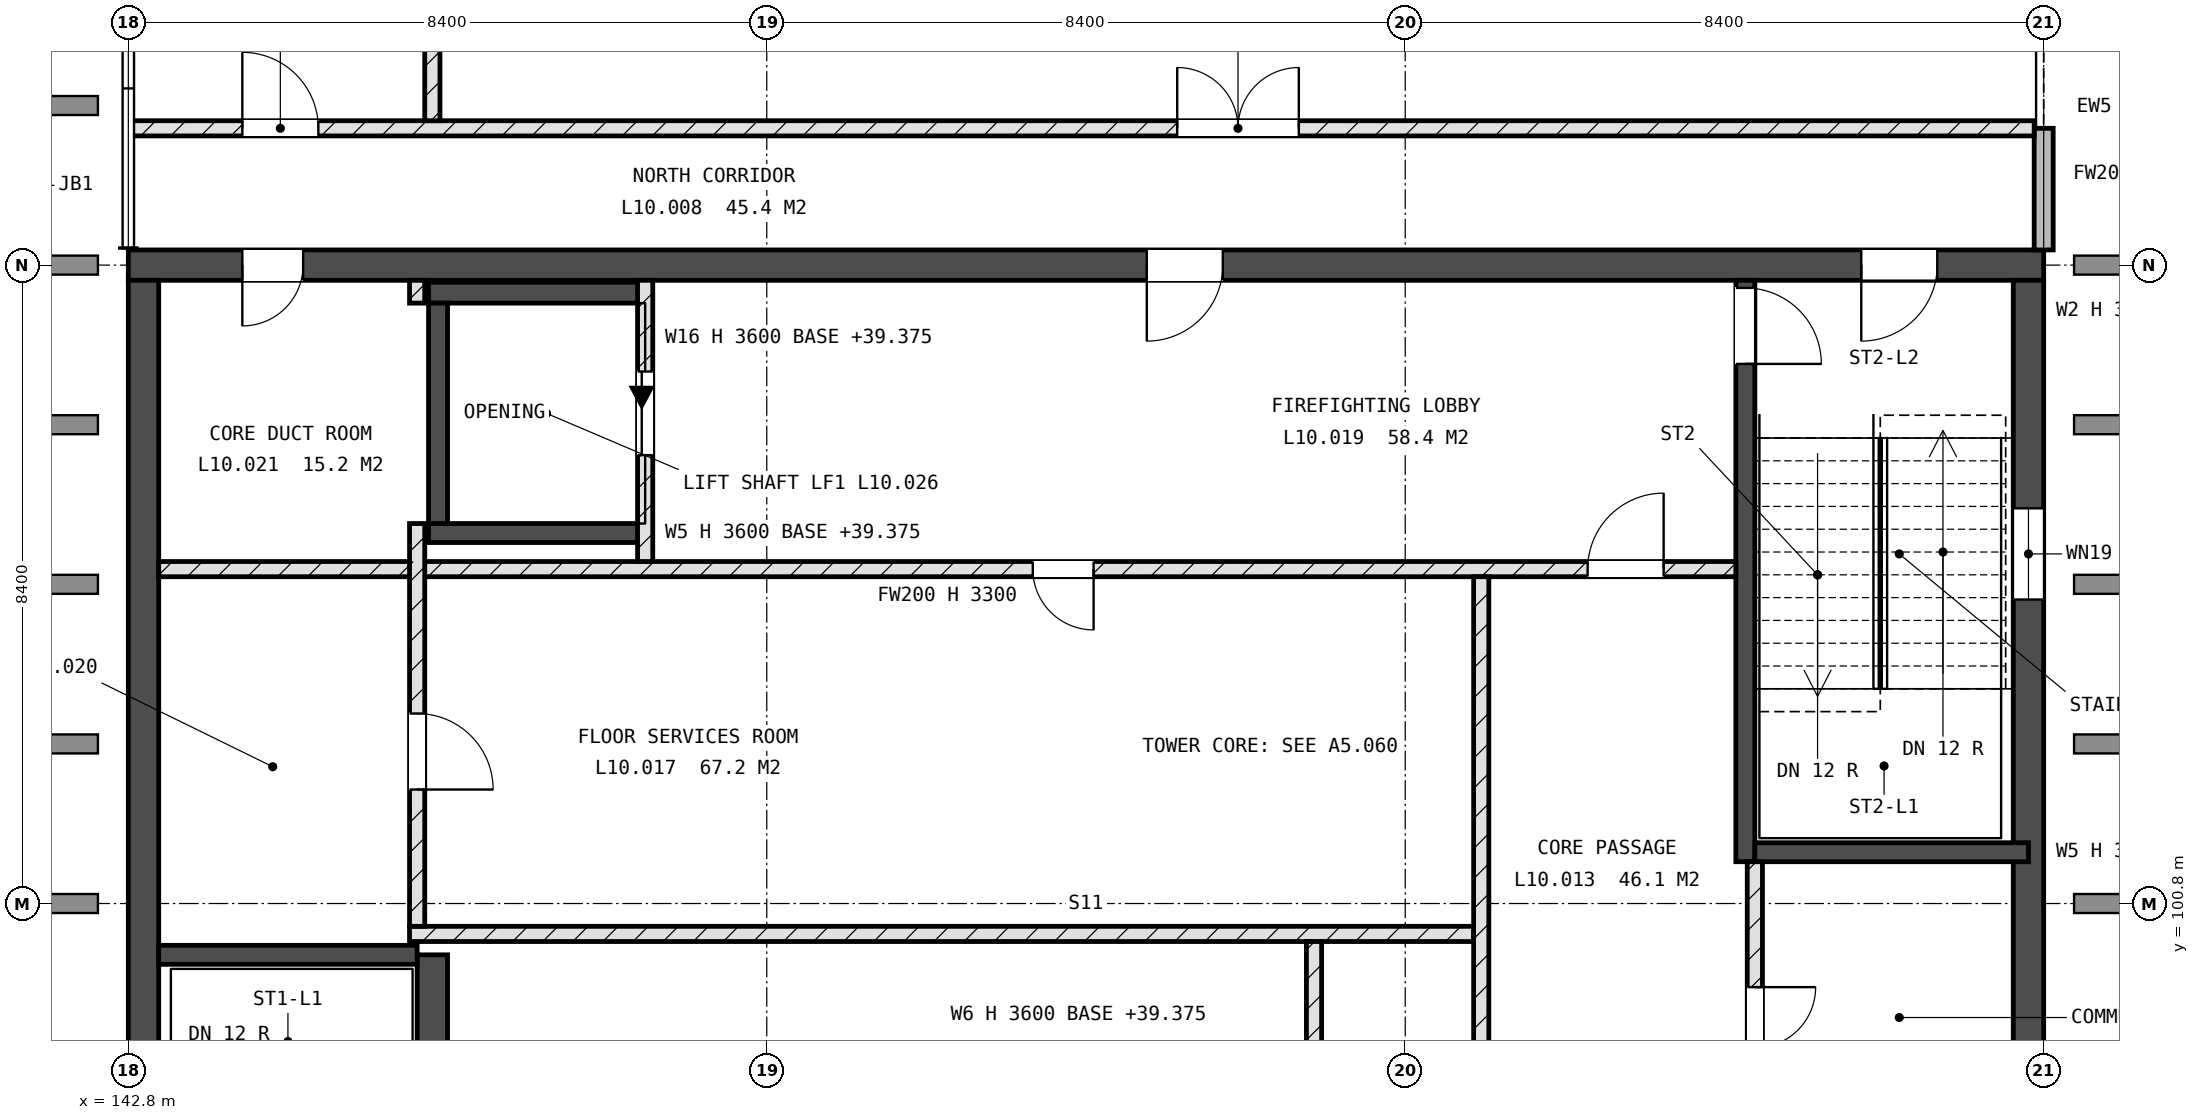
"""IFC4 building model, lengths in metres.
Left out: names, types, materials, properties, quantities, classifications, styles, units other than length and angle.
Written with IfcOpenShell. Run it as: python <this file> out.ifc"""

import sys

from ifc_helpers import new_model, si_unit, direction, frame, frame_2d, origin, place, context, subcontext, project, spatial, rectangle, extrude, element, fill, save


model = new_model("IFC4")
c1 = context("Model", 3, precision=1e-05, world=origin(), true_north=direction((0.0, 1.0)))
c2 = subcontext(c1, "Body", "Model", "MODEL_VIEW")
j1 = project(units=[si_unit("LENGTHUNIT", "METRE"), si_unit("PLANEANGLEUNIT", "RADIAN")], contexts=[c1])
p1 = place(None, origin())
s1 = spatial("IfcSite", under=j1, at=p1, CompositionType="ELEMENT")
p2 = place(p1, origin())
s2 = spatial("IfcBuilding", under=s1, at=p2, CompositionType="ELEMENT")
p3 = place(p2, frame((0.0, 0.0, 39.6)))
s3 = spatial("IfcBuildingStorey", under=s2, at=p3, CompositionType="ELEMENT", Elevation=39.6)
p4 = place(p3, frame((142.8, 109.2, -0.225), z_axis=(0.0, 0.0, 1.0), x_axis=(1.0, 0.0, 0.0)))
e1 = element("IfcWall", 1, at=p4, inside=s3, PredefinedType="SHEAR", context=c2, shape_type="SweptSolid", body=[
    extrude(rectangle(XDim=25.2, YDim=0.4, at=frame_2d((12.6, 0.0))), origin(), (0.0, 0.0, 1.0), 3.6),
])
p5 = place(p4, frame((22.8, 0.0, 0.225)))
e2 = element("IfcOpeningElement", 2, at=p5, cuts=e1, PredefinedType="OPENING", context=c2, shape_type="SweptSolid", body=[
    extrude(rectangle(XDim=1.0, YDim=2.1, at=frame_2d((0.5, 1.05))), frame((0.0, 0.21, 0.0), z_axis=(0.0, -1.0, 0.0), x_axis=(1.0, 0.0, 0.0)), (0.0, 0.0, 1.0), 0.42),
])
p6 = place(p4, frame((1.5, 0.0, 0.225)))
e3 = element("IfcOpeningElement", 3, at=p6, cuts=e1, PredefinedType="OPENING", context=c2, shape_type="SweptSolid", body=[
    extrude(rectangle(XDim=0.8, YDim=2.1, at=frame_2d((0.4, 1.05))), frame((0.0, 0.21, 0.0), z_axis=(0.0, -1.0, 0.0), x_axis=(1.0, 0.0, 0.0)), (0.0, 0.0, 1.0), 0.42),
])
p7 = place(p4, frame((13.4, 0.0, 0.225)))
e4 = element("IfcOpeningElement", 4, at=p7, cuts=e1, PredefinedType="OPENING", context=c2, shape_type="SweptSolid", body=[
    extrude(rectangle(XDim=1.0, YDim=2.1, at=frame_2d((0.5, 1.05))), frame((0.0, 0.21, 0.0), z_axis=(0.0, -1.0, 0.0), x_axis=(1.0, 0.0, 0.0)), (0.0, 0.0, 1.0), 0.42),
])
p8 = place(p3, frame((143.0, 92.6, -0.225), z_axis=(0.0, 0.0, 1.0), x_axis=(0.0, 1.0, 0.0)))
e5 = element("IfcWall", 5, at=p8, inside=s3, PredefinedType="SHEAR", context=c2, shape_type="SweptSolid", body=[
    extrude(rectangle(XDim=16.4, YDim=0.4, at=frame_2d((8.2, 0.0))), origin(), (0.0, 0.0, 1.0), 3.6),
])
p9 = place(p8, frame((3.0, 0.0, 1.825)))
e6 = element("IfcOpeningElement", 6, at=p9, cuts=e5, PredefinedType="OPENING", context=c2, shape_type="SweptSolid", body=[
    extrude(rectangle(XDim=1.2, YDim=0.9, at=frame_2d((0.6, 0.45))), frame((0.0, 0.21, 0.0), z_axis=(0.0, -1.0, 0.0), x_axis=(1.0, 0.0, 0.0)), (0.0, 0.0, 1.0), 0.42),
])
p10 = place(p3, frame((167.8, 92.6, -0.225), z_axis=(0.0, 0.0, 1.0), x_axis=(0.0, 1.0, 0.0)))
e7 = element("IfcWall", 7, at=p10, inside=s3, PredefinedType="SHEAR", context=c2, shape_type="SweptSolid", body=[
    extrude(rectangle(XDim=16.4, YDim=0.4, at=frame_2d((8.2, 0.0))), origin(), (0.0, 0.0, 1.0), 3.6),
])
p11 = place(p10, frame((12.2, 0.0, 1.825)))
e8 = element("IfcOpeningElement", 8, at=p11, cuts=e7, PredefinedType="OPENING", context=c2, shape_type="SweptSolid", body=[
    extrude(rectangle(XDim=1.2, YDim=0.9, at=frame_2d((0.6, 0.45))), frame((0.0, 0.21, 0.0), z_axis=(0.0, -1.0, 0.0), x_axis=(1.0, 0.0, 0.0)), (0.0, 0.0, 1.0), 0.42),
])
p12 = place(p3, frame((146.8, 92.6, -0.225), z_axis=(0.0, 0.0, 1.0), x_axis=(0.0, 1.0, 0.0)))
e9 = element("IfcWall", 9, at=p12, inside=s3, PredefinedType="SHEAR", context=c2, shape_type="SweptSolid", body=[
    extrude(rectangle(XDim=7.525, YDim=0.4, at=frame_2d((3.762, 0.0))), origin(), (0.0, 0.0, 1.0), 3.6),
])
p13 = place(p12, frame((0.1, 0.0, 0.225)))
e10 = element("IfcOpeningElement", 10, at=p13, cuts=e9, PredefinedType="OPENING", context=c2, shape_type="SweptSolid", body=[
    extrude(rectangle(XDim=1.0, YDim=2.1, at=frame_2d((0.5, 1.05))), frame((0.0, 0.21, 0.0), z_axis=(0.0, -1.0, 0.0), x_axis=(1.0, 0.0, 0.0)), (0.0, 0.0, 1.0), 0.42),
])
p14 = place(p3, frame((143.2, 100.125, -0.225), z_axis=(0.0, 0.0, 1.0), x_axis=(1.0, 0.0, 0.0)))
e11 = element("IfcWall", 11, at=p14, inside=s3, PredefinedType="SHEAR", context=c2, shape_type="SweptSolid", body=[
    extrude(rectangle(XDim=3.4, YDim=0.25, at=frame_2d((1.7, 0.0))), origin(), (0.0, 0.0, 1.0), 3.6),
])
p15 = place(p3, frame((164.075, 101.35, -0.225), z_axis=(0.0, 0.0, 1.0), x_axis=(0.0, 1.0, 0.0)))
e12 = element("IfcWall", 12, at=p15, inside=s3, PredefinedType="SHEAR", context=c2, shape_type="SweptSolid", body=[
    extrude(rectangle(XDim=7.65, YDim=0.25, at=frame_2d((3.825, 0.0))), origin(), (0.0, 0.0, 1.0), 3.6),
])
p16 = place(p15, frame((6.55, 0.0, 0.225)))
e13 = element("IfcOpeningElement", 13, at=p16, cuts=e12, PredefinedType="OPENING", context=c2, shape_type="SweptSolid", body=[
    extrude(rectangle(XDim=1.0, YDim=2.1, at=frame_2d((0.5, 1.05))), frame((0.0, 0.135, 0.0), z_axis=(0.0, -1.0, 0.0), x_axis=(1.0, 0.0, 0.0)), (0.0, 0.0, 1.0), 0.27),
])
p17 = place(p3, frame((164.2, 101.475, -0.225), z_axis=(0.0, 0.0, 1.0), x_axis=(1.0, 0.0, 0.0)))
e14 = element("IfcWall", 14, at=p17, inside=s3, PredefinedType="SHEAR", context=c2, shape_type="SweptSolid", body=[
    extrude(rectangle(XDim=3.6, YDim=0.25, at=frame_2d((1.8, 0.0))), origin(), (0.0, 0.0, 1.0), 3.6),
])
p18 = place(p3, frame((146.75, 105.675, -0.225), z_axis=(0.0, 0.0, 1.0), x_axis=(1.0, 0.0, 0.0)))
e15 = element("IfcWall", 15, at=p18, inside=s3, PredefinedType="SHEAR", context=c2, shape_type="SweptSolid", body=[
    extrude(rectangle(XDim=2.85, YDim=0.25, at=frame_2d((1.425, 0.0))), origin(), (0.0, 0.0, 1.0), 3.6),
])
p19 = place(p3, frame((146.75, 108.837, -0.225), z_axis=(0.0, 0.0, 1.0), x_axis=(1.0, 0.0, 0.0)))
e16 = element("IfcWall", 16, at=p19, inside=s3, PredefinedType="SHEAR", context=c2, shape_type="SweptSolid", body=[
    extrude(rectangle(XDim=2.85, YDim=0.275, at=frame_2d((1.425, 0.0))), origin(), (0.0, 0.0, 1.0), 3.6),
])
p20 = place(p3, frame((146.875, 105.8, -0.225), z_axis=(0.0, 0.0, 1.0), x_axis=(0.0, 1.0, 0.0)))
e17 = element("IfcWall", 17, at=p20, inside=s3, PredefinedType="SHEAR", context=c2, shape_type="SweptSolid", body=[
    extrude(rectangle(XDim=2.9, YDim=0.25, at=frame_2d((1.45, 0.0))), origin(), (0.0, 0.0, 1.0), 3.6),
])
p21 = place(p3, frame((168.0, 109.4, 0.0), z_axis=(0.0, 0.0, 1.0), x_axis=(0.0, 1.0, 0.0)))
e18 = element("IfcWall", 18, at=p21, inside=s3, PredefinedType="STANDARD", context=c2, shape_type="SweptSolid", body=[
    extrude(rectangle(XDim=1.6, YDim=0.25, at=frame_2d((0.8, 0.0))), origin(), (0.0, 0.0, 1.0), 3.3),
])
p22 = place(p3, frame((146.5, 100.4, 0.0), z_axis=(0.0, 0.0, 1.0), x_axis=(1.0, 0.0, 0.0)))
e19 = element("IfcWall", 19, at=p22, inside=s3, PredefinedType="SOLIDWALL", context=c2, shape_type="SweptSolid", body=[
    extrude(rectangle(XDim=14.0, YDim=0.2, at=frame_2d((7.0, 0.0))), origin(), (0.0, 0.0, 1.0), 3.3),
])
p23 = place(p3, frame((143.2, 105.2, 0.0), z_axis=(0.0, 0.0, 1.0), x_axis=(1.0, 0.0, 0.0)))
e20 = element("IfcWall", 20, at=p23, inside=s3, PredefinedType="SOLIDWALL", context=c2, shape_type="SweptSolid", body=[
    extrude(rectangle(XDim=20.75, YDim=0.2, at=frame_2d((10.375, 0.0))), origin(), (0.0, 0.0, 1.0), 3.3),
])
p24 = place(p23, frame((11.5, 0.0, 0.0)))
e21 = element("IfcOpeningElement", 21, at=p24, cuts=e20, PredefinedType="OPENING", context=c2, shape_type="SweptSolid", body=[
    extrude(rectangle(XDim=0.8, YDim=2.1, at=frame_2d((0.4, 1.05))), frame((0.0, 0.11, 0.0), z_axis=(0.0, -1.0, 0.0), x_axis=(1.0, 0.0, 0.0)), (0.0, 0.0, 1.0), 0.22),
])
p25 = place(p23, frame((18.8, 0.0, 0.0)))
e22 = element("IfcOpeningElement", 22, at=p25, cuts=e20, PredefinedType="OPENING", context=c2, shape_type="SweptSolid", body=[
    extrude(rectangle(XDim=1.0, YDim=2.1, at=frame_2d((0.5, 1.05))), frame((0.0, 0.11, 0.0), z_axis=(0.0, -1.0, 0.0), x_axis=(1.0, 0.0, 0.0)), (0.0, 0.0, 1.0), 0.22),
])
p26 = place(p3, frame((142.8, 111.0, 0.0), z_axis=(0.0, 0.0, 1.0), x_axis=(1.0, 0.0, 0.0)))
e23 = element("IfcWall", 23, at=p26, inside=s3, PredefinedType="SOLIDWALL", context=c2, shape_type="SweptSolid", body=[
    extrude(rectangle(XDim=25.075, YDim=0.2, at=frame_2d((12.538, 0.0))), origin(), (0.0, 0.0, 1.0), 3.3),
])
p27 = place(p26, frame((1.5, 0.0, 0.0)))
e24 = element("IfcOpeningElement", 24, at=p27, cuts=e23, PredefinedType="OPENING", context=c2, shape_type="SweptSolid", body=[
    extrude(rectangle(XDim=1.0, YDim=2.1, at=frame_2d((0.5, 1.05))), frame((0.0, 0.11, 0.0), z_axis=(0.0, -1.0, 0.0), x_axis=(1.0, 0.0, 0.0)), (0.0, 0.0, 1.0), 0.22),
])
p28 = place(p26, frame((13.8, 0.0, 0.0)))
e25 = element("IfcOpeningElement", 25, at=p28, cuts=e23, PredefinedType="OPENING", context=c2, shape_type="SweptSolid", body=[
    extrude(rectangle(XDim=1.6, YDim=2.25, at=frame_2d((0.8, 1.125))), frame((0.0, 0.11, 0.0), z_axis=(0.0, -1.0, 0.0), x_axis=(1.0, 0.0, 0.0)), (0.0, 0.0, 1.0), 0.22),
])
p29 = place(p3, frame((146.6, 100.5, 0.0), z_axis=(0.0, 0.0, 1.0), x_axis=(0.0, 1.0, 0.0)))
e26 = element("IfcWall", 26, at=p29, inside=s3, PredefinedType="SOLIDWALL", context=c2, shape_type="SweptSolid", body=[
    extrude(rectangle(XDim=5.3, YDim=0.2, at=frame_2d((2.65, 0.0))), origin(), (0.0, 0.0, 1.0), 3.3),
])
p30 = place(p29, frame((1.8, 0.0, 0.0)))
e27 = element("IfcOpeningElement", 27, at=p30, cuts=e26, PredefinedType="OPENING", context=c2, shape_type="SweptSolid", body=[
    extrude(rectangle(XDim=1.0, YDim=2.1, at=frame_2d((0.5, 1.05))), frame((0.0, 0.11, 0.0), z_axis=(0.0, -1.0, 0.0), x_axis=(1.0, 0.0, 0.0)), (0.0, 0.0, 1.0), 0.22),
])
p31 = place(p3, frame((146.6, 108.7, 0.0), z_axis=(0.0, 0.0, 1.0), x_axis=(0.0, 1.0, 0.0)))
e28 = element("IfcWall", 28, at=p31, inside=s3, PredefinedType="SOLIDWALL", context=c2, shape_type="SweptSolid", body=[
    extrude(rectangle(XDim=0.3, YDim=0.2, at=frame_2d((0.15, 0.0))), origin(), (0.0, 0.0, 1.0), 3.3),
])
p32 = place(p3, frame((146.8, 111.1, 0.0), z_axis=(0.0, 0.0, 1.0), x_axis=(0.0, 1.0, 0.0)))
e29 = element("IfcWall", 29, at=p32, inside=s3, PredefinedType="SOLIDWALL", context=c2, shape_type="SweptSolid", body=[
    extrude(rectangle(XDim=6.375, YDim=0.2, at=frame_2d((3.188, 0.0))), origin(), (0.0, 0.0, 1.0), 3.3),
])
p33 = place(p3, frame((149.6, 105.3, 0.0), z_axis=(0.0, 0.0, 1.0), x_axis=(0.0, 1.0, 0.0)))
e30 = element("IfcWall", 30, at=p33, inside=s3, PredefinedType="SOLIDWALL", context=c2, shape_type="SweptSolid", body=[
    extrude(rectangle(XDim=3.7, YDim=0.2, at=frame_2d((1.85, 0.0))), origin(), (0.0, 0.0, 1.0), 3.3),
])
p34 = place(p33, frame((1.4, 0.0, 0.0)))
e31 = element("IfcOpeningElement", 31, at=p34, cuts=e30, PredefinedType="OPENING", context=c2, shape_type="SweptSolid", body=[
    extrude(rectangle(XDim=1.1, YDim=2.1, at=frame_2d((0.55, 1.05))), frame((0.0, 0.11, 0.0), z_axis=(0.0, -1.0, 0.0), x_axis=(1.0, 0.0, 0.0)), (0.0, 0.0, 1.0), 0.22),
])
p35 = place(p3, frame((158.4, 98.7, 0.0), z_axis=(0.0, 0.0, 1.0), x_axis=(0.0, 1.0, 0.0)))
e32 = element("IfcWall", 32, at=p35, inside=s3, PredefinedType="SOLIDWALL", context=c2, shape_type="SweptSolid", body=[
    extrude(rectangle(XDim=1.6, YDim=0.2, at=frame_2d((0.8, 0.0))), origin(), (0.0, 0.0, 1.0), 3.3),
])
p36 = place(p3, frame((160.6, 92.6, 0.0), z_axis=(0.0, 0.0, 1.0), x_axis=(0.0, 1.0, 0.0)))
e33 = element("IfcWall", 33, at=p36, inside=s3, PredefinedType="SOLIDWALL", context=c2, shape_type="SweptSolid", body=[
    extrude(rectangle(XDim=12.5, YDim=0.2, at=frame_2d((6.25, 0.0))), origin(), (0.0, 0.0, 1.0), 3.3),
])
p37 = place(p36, frame((5.1, 0.0, 0.0)))
e34 = element("IfcOpeningElement", 34, at=p37, cuts=e33, PredefinedType="OPENING", context=c2, shape_type="SweptSolid", body=[
    extrude(rectangle(XDim=0.8, YDim=2.1, at=frame_2d((0.4, 1.05))), frame((0.0, 0.11, 0.0), z_axis=(0.0, -1.0, 0.0), x_axis=(1.0, 0.0, 0.0)), (0.0, 0.0, 1.0), 0.22),
])
p38 = place(p36, frame((0.8, 0.0, 0.0)))
e35 = element("IfcOpeningElement", 35, at=p38, cuts=e33, PredefinedType="OPENING", context=c2, shape_type="SweptSolid", body=[
    extrude(rectangle(XDim=1.0, YDim=2.1, at=frame_2d((0.5, 1.05))), frame((0.0, 0.11, 0.0), z_axis=(0.0, -1.0, 0.0), x_axis=(1.0, 0.0, 0.0)), (0.0, 0.0, 1.0), 0.22),
])
p39 = place(p3, frame((164.2, 92.6, 0.0), z_axis=(0.0, 0.0, 1.0), x_axis=(0.0, 1.0, 0.0)))
e36 = element("IfcWall", 36, at=p39, inside=s3, PredefinedType="SOLIDWALL", context=c2, shape_type="SweptSolid", body=[
    extrude(rectangle(XDim=8.75, YDim=0.2, at=frame_2d((4.375, 0.0))), origin(), (0.0, 0.0, 1.0), 3.3),
])
p40 = place(p39, frame((1.7, 0.0, 0.0)))
e37 = element("IfcOpeningElement", 37, at=p40, cuts=e36, PredefinedType="OPENING", context=c2, shape_type="SweptSolid", body=[
    extrude(rectangle(XDim=0.8, YDim=2.1, at=frame_2d((0.4, 1.05))), frame((0.0, 0.11, 0.0), z_axis=(0.0, -1.0, 0.0), x_axis=(1.0, 0.0, 0.0)), (0.0, 0.0, 1.0), 0.22),
])
p41 = place(p39, frame((6.3, 0.0, 0.0)))
e38 = element("IfcOpeningElement", 38, at=p41, cuts=e36, PredefinedType="OPENING", context=c2, shape_type="SweptSolid", body=[
    extrude(rectangle(XDim=0.8, YDim=2.1, at=frame_2d((0.4, 1.05))), frame((0.0, 0.11, 0.0), z_axis=(0.0, -1.0, 0.0), x_axis=(1.0, 0.0, 0.0)), (0.0, 0.0, 1.0), 0.22),
])
p42 = place(p11, origin())
e39 = element("IfcWindow", 39, at=p42, inside=s3, PartitioningType="SINGLE_PANEL", PredefinedType="WINDOW", context=c2, shape_type="SweptSolid", body=[
    extrude(rectangle(XDim=1.2, YDim=0.9, at=frame_2d((0.6, 0.45))), frame((0.0, 0.03, 0.0), z_axis=(0.0, -1.0, 0.0), x_axis=(1.0, 0.0, 0.0)), (0.0, 0.0, 1.0), 0.06),
])
fill(e8, e39)
p43 = place(p34, origin())
e40 = element("IfcDoor", 40, at=p43, inside=s3, OperationType="SLIDING_TO_LEFT", PredefinedType="DOOR", context=c2, shape_type="SweptSolid", body=[
    extrude(rectangle(XDim=1.1, YDim=2.1, at=frame_2d((0.55, 1.05))), frame((0.0, 0.025, 0.0), z_axis=(0.0, -1.0, 0.0), x_axis=(1.0, 0.0, 0.0)), (0.0, 0.0, 1.0), 0.05),
])
fill(e31, e40)
p44 = place(p16, origin())
e41 = element("IfcDoor", 41, at=p44, inside=s3, OperationType="SINGLE_SWING_LEFT", PredefinedType="DOOR", context=c2, shape_type="SweptSolid", body=[
    extrude(rectangle(XDim=1.0, YDim=2.1, at=frame_2d((0.5, 1.05))), frame((0.0, 0.025, 0.0), z_axis=(0.0, -1.0, 0.0), x_axis=(1.0, 0.0, 0.0)), (0.0, 0.0, 1.0), 0.05),
])
fill(e13, e41)
p45 = place(p5, origin())
e42 = element("IfcDoor", 42, at=p45, inside=s3, OperationType="SINGLE_SWING_LEFT", PredefinedType="DOOR", context=c2, shape_type="SweptSolid", body=[
    extrude(rectangle(XDim=1.0, YDim=2.1, at=frame_2d((0.5, 1.05))), frame((0.0, 0.025, 0.0), z_axis=(0.0, -1.0, 0.0), x_axis=(1.0, 0.0, 0.0)), (0.0, 0.0, 1.0), 0.05),
])
fill(e2, e42)
p46 = place(p27, origin())
e43 = element("IfcDoor", 43, at=p46, inside=s3, OperationType="SINGLE_SWING_RIGHT", PredefinedType="DOOR", context=c2, shape_type="SweptSolid", body=[
    extrude(rectangle(XDim=1.0, YDim=2.1, at=frame_2d((0.5, 1.05))), frame((0.0, 0.025, 0.0), z_axis=(0.0, -1.0, 0.0), x_axis=(1.0, 0.0, 0.0)), (0.0, 0.0, 1.0), 0.05),
])
fill(e24, e43)
p47 = place(p28, origin())
e44 = element("IfcDoor", 44, at=p47, inside=s3, OperationType="DOUBLE_DOOR_SINGLE_SWING", PredefinedType="DOOR", context=c2, shape_type="SweptSolid", body=[
    extrude(rectangle(XDim=1.6, YDim=2.25, at=frame_2d((0.8, 1.125))), frame((0.0, 0.025, 0.0), z_axis=(0.0, -1.0, 0.0), x_axis=(1.0, 0.0, 0.0)), (0.0, 0.0, 1.0), 0.05),
])
fill(e25, e44)
p48 = place(p41, origin())
e45 = element("IfcDoor", 45, at=p48, inside=s3, OperationType="SINGLE_SWING_RIGHT", PredefinedType="DOOR", context=c2, shape_type="SweptSolid", body=[
    extrude(rectangle(XDim=0.8, YDim=2.1, at=frame_2d((0.4, 1.05))), frame((0.0, 0.025, 0.0), z_axis=(0.0, -1.0, 0.0), x_axis=(1.0, 0.0, 0.0)), (0.0, 0.0, 1.0), 0.05),
])
fill(e38, e45)
p49 = place(p24, origin())
e46 = element("IfcDoor", 46, at=p49, inside=s3, OperationType="SINGLE_SWING_RIGHT", PredefinedType="DOOR", context=c2, shape_type="SweptSolid", body=[
    extrude(rectangle(XDim=0.8, YDim=2.1, at=frame_2d((0.4, 1.05))), frame((0.0, 0.025, 0.0), z_axis=(0.0, -1.0, 0.0), x_axis=(1.0, 0.0, 0.0)), (0.0, 0.0, 1.0), 0.05),
])
fill(e21, e46)
p50 = place(p30, origin())
e47 = element("IfcDoor", 47, at=p50, inside=s3, OperationType="SINGLE_SWING_LEFT", PredefinedType="DOOR", context=c2, shape_type="SweptSolid", body=[
    extrude(rectangle(XDim=1.0, YDim=2.1, at=frame_2d((0.5, 1.05))), frame((0.0, 0.025, 0.0), z_axis=(0.0, -1.0, 0.0), x_axis=(1.0, 0.0, 0.0)), (0.0, 0.0, 1.0), 0.05),
])
fill(e27, e47)
p51 = place(p6, origin())
e48 = element("IfcDoor", 48, at=p51, inside=s3, OperationType="SINGLE_SWING_LEFT", PredefinedType="DOOR", context=c2, shape_type="SweptSolid", body=[
    extrude(rectangle(XDim=0.8, YDim=2.1, at=frame_2d((0.4, 1.05))), frame((0.0, 0.025, 0.0), z_axis=(0.0, -1.0, 0.0), x_axis=(1.0, 0.0, 0.0)), (0.0, 0.0, 1.0), 0.05),
])
fill(e3, e48)
p52 = place(p7, origin())
e49 = element("IfcDoor", 49, at=p52, inside=s3, OperationType="SINGLE_SWING_LEFT", PredefinedType="DOOR", context=c2, shape_type="SweptSolid", body=[
    extrude(rectangle(XDim=1.0, YDim=2.1, at=frame_2d((0.5, 1.05))), frame((0.0, 0.025, 0.0), z_axis=(0.0, -1.0, 0.0), x_axis=(1.0, 0.0, 0.0)), (0.0, 0.0, 1.0), 0.05),
])
fill(e4, e49)
p53 = place(p25, origin())
e50 = element("IfcDoor", 50, at=p53, inside=s3, OperationType="SINGLE_SWING_LEFT", PredefinedType="DOOR", context=c2, shape_type="SweptSolid", body=[
    extrude(rectangle(XDim=1.0, YDim=2.1, at=frame_2d((0.5, 1.05))), frame((0.0, 0.025, 0.0), z_axis=(0.0, -1.0, 0.0), x_axis=(1.0, 0.0, 0.0)), (0.0, 0.0, 1.0), 0.05),
])
fill(e22, e50)
save(model, sys.argv[1])
